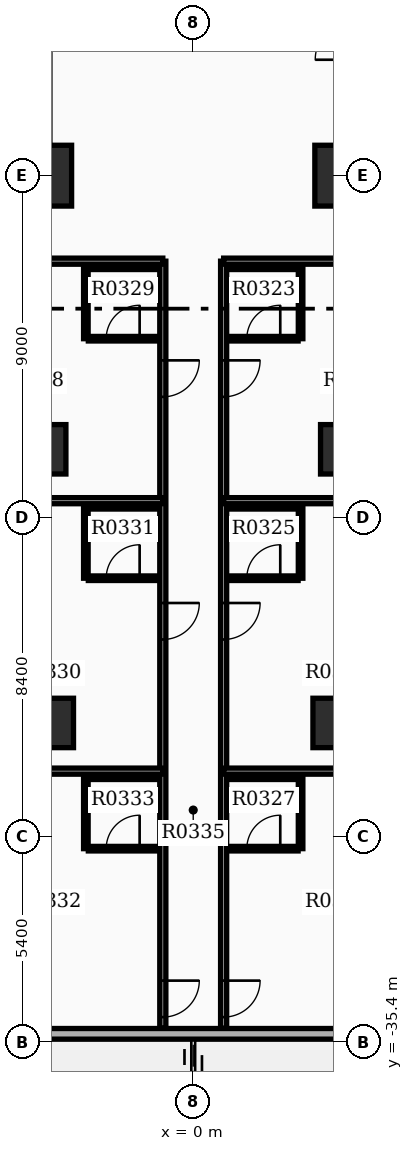
"""IFC4 building model, lengths in metres.
Left out: names, types, materials, properties, quantities, classifications, styles, units other than length and angle.
Written with IfcOpenShell. Run it as: python <this file> out.ifc"""

import sys

from ifc_helpers import new_model, si_unit, direction, frame, frame_2d, origin, origin_2d, place, context, subcontext, project, spatial, rectangle, extrude, element, fill, save


model = new_model("IFC4")
c1 = context("Model", 3, precision=1e-05, world=origin(), true_north=direction((0.0, 1.0)))
c2 = subcontext(c1, "Body", "Model", "MODEL_VIEW")
j1 = project(units=[si_unit("LENGTHUNIT", "METRE"), si_unit("PLANEANGLEUNIT", "RADIAN")], contexts=[c1])
p1 = place(None, origin())
s1 = spatial("IfcSite", under=j1, at=p1, CompositionType="ELEMENT")
p2 = place(p1, origin())
s2 = spatial("IfcBuilding", under=s1, at=p2, CompositionType="ELEMENT")
p3 = place(p2, frame((0.0, 0.0, 23.7)))
s3 = spatial("IfcBuildingStorey", under=s2, at=p3, CompositionType="ELEMENT", Elevation=23.7)
for number, where, z_axis, x_axis in (
    (1, (-4.0, -12.6, 0.0), (0.0, 0.0, 1.0), (1.0, 0.0, 0.0)),
    (2, (4.0, -12.6, 0.0), (0.0, 0.0, 1.0), (1.0, 0.0, 0.0)),
):
    element("IfcColumn", number, at=place(p3, frame(where, z_axis=z_axis, x_axis=x_axis)), inside=s3, PredefinedType="COLUMN", context=c2, shape_type="SweptSolid", body=[
        extrude(rectangle(XDim=1.6, YDim=1.6, at=origin_2d()), origin(), (0.0, 0.0, 1.0), 3.9),
    ])
for number, where, z_axis, x_axis in (
    (3, (-4.0, -19.8, 0.0), (0.0, 0.0, 1.0), (1.0, 0.0, 0.0)),
    (4, (4.0, -19.8, 0.0), (0.0, 0.0, 1.0), (1.0, 0.0, 0.0)),
    (5, (-3.8, -27.0, 0.0), (0.0, 0.0, 1.0), (1.0, 0.0, 0.0)),
    (6, (3.8, -27.0, 0.0), (0.0, 0.0, 1.0), (1.0, 0.0, 0.0)),
):
    element("IfcColumn", number, at=place(p3, frame(where, z_axis=z_axis, x_axis=x_axis)), inside=s3, PredefinedType="COLUMN", context=c2, shape_type="SweptSolid", body=[
        extrude(rectangle(XDim=1.3, YDim=1.3, at=origin_2d()), origin(), (0.0, 0.0, 1.0), 3.9),
    ])
p4 = place(p3, frame((-6.86, -35.18, 0.0), z_axis=(0.0, 0.0, 1.0), x_axis=(1.0, 0.0, 0.0)))
e7 = element("IfcWall", 7, at=p4, inside=s3, PredefinedType="STANDARD", context=c2, shape_type="SweptSolid", body=[
    extrude(rectangle(XDim=13.72, YDim=0.28, at=frame_2d((6.86, 0.0))), origin(), (0.0, 0.0, 1.0), 2.91),
])
p5 = place(p4, frame((0.85, 0.0, 0.85)))
e8 = element("IfcOpeningElement", 8, at=p5, cuts=e7, PredefinedType="OPENING", context=c2, shape_type="SweptSolid", body=[
    extrude(rectangle(XDim=1.0, YDim=1.5, at=frame_2d((0.5, 0.75))), frame((0.0, 0.15, 0.0), z_axis=(0.0, -1.0, 0.0), x_axis=(1.0, 0.0, 0.0)), (0.0, 0.0, 1.0), 0.3),
])
p6 = place(p3, frame((0.8, -14.85, 0.0), z_axis=(0.0, 0.0, 1.0), x_axis=(0.0, -1.0, 0.0)))
e9 = element("IfcWall", 9, at=p6, inside=s3, PredefinedType="PARTITIONING", context=c2, shape_type="SweptSolid", body=[
    extrude(rectangle(XDim=20.182, YDim=0.16, at=frame_2d((10.091, 0.0))), origin(), (0.0, 0.0, 1.0), 2.9),
])
p7 = place(p6, frame((2.61, 0.0, 0.0)))
e10 = element("IfcOpeningElement", 10, at=p7, cuts=e9, PredefinedType="OPENING", context=c2, shape_type="SweptSolid", body=[
    extrude(rectangle(XDim=0.96, YDim=2.15, at=frame_2d((0.48, 1.075))), frame((0.0, 0.09, 0.0), z_axis=(0.0, -1.0, 0.0), x_axis=(1.0, 0.0, 0.0)), (0.0, 0.0, 1.0), 0.18),
])
p8 = place(p6, frame((8.994, 0.0, 0.0)))
e11 = element("IfcOpeningElement", 11, at=p8, cuts=e9, PredefinedType="OPENING", context=c2, shape_type="SweptSolid", body=[
    extrude(rectangle(XDim=0.96, YDim=2.15, at=frame_2d((0.48, 1.075))), frame((0.0, 0.09, 0.0), z_axis=(0.0, -1.0, 0.0), x_axis=(1.0, 0.0, 0.0)), (0.0, 0.0, 1.0), 0.18),
])
p9 = place(p6, frame((18.93, 0.0, 0.0)))
e12 = element("IfcOpeningElement", 12, at=p9, cuts=e9, PredefinedType="OPENING", context=c2, shape_type="SweptSolid", body=[
    extrude(rectangle(XDim=0.96, YDim=2.15, at=frame_2d((0.48, 1.075))), frame((0.0, 0.09, 0.0), z_axis=(0.0, -1.0, 0.0), x_axis=(1.0, 0.0, 0.0)), (0.0, 0.0, 1.0), 0.18),
])
p10 = place(p3, frame((0.8, -14.85, 0.0), z_axis=(0.0, 0.0, 1.0), x_axis=(1.0, 0.0, 0.0)))
e13 = element("IfcWall", 13, at=p10, inside=s3, PredefinedType="PARTITIONING", context=c2, shape_type="SweptSolid", body=[
    extrude(rectangle(XDim=5.92, YDim=0.16, at=frame_2d((2.96, 0.0))), origin(), (0.0, 0.0, 1.0), 2.9),
])
p11 = place(p3, frame((0.8, -21.152, 0.0), z_axis=(0.0, 0.0, 1.0), x_axis=(1.0, 0.0, 0.0)))
e14 = element("IfcWall", 14, at=p11, inside=s3, PredefinedType="PARTITIONING", context=c2, shape_type="SweptSolid", body=[
    extrude(rectangle(XDim=5.772, YDim=0.16, at=frame_2d((2.886, 0.0))), origin(), (0.0, 0.0, 1.0), 2.9),
])
p12 = place(p3, frame((0.94, -16.89, 0.0), z_axis=(0.0, 0.0, 1.0), x_axis=(1.0, 0.0, 0.0)))
e15 = element("IfcWall", 15, at=p12, inside=s3, PredefinedType="PARTITIONING", context=c2, shape_type="SweptSolid", body=[
    extrude(rectangle(XDim=1.82, YDim=0.12, at=frame_2d((0.91, 0.0))), origin(), (0.0, 0.0, 1.0), 2.9),
])
p13 = place(p12, frame((0.47, 0.0, 0.0)))
e16 = element("IfcOpeningElement", 16, at=p13, cuts=e15, PredefinedType="OPENING", context=c2, shape_type="SweptSolid", body=[
    extrude(rectangle(XDim=0.88, YDim=2.1, at=frame_2d((0.44, 1.05))), frame((0.0, 0.07, 0.0), z_axis=(0.0, -1.0, 0.0), x_axis=(1.0, 0.0, 0.0)), (0.0, 0.0, 1.0), 0.14),
])
p14 = place(p3, frame((0.94, -15.01, 0.0), z_axis=(0.0, 0.0, 1.0), x_axis=(1.0, 0.0, 0.0)))
e17 = element("IfcWall", 17, at=p14, inside=s3, PredefinedType="PARTITIONING", context=c2, shape_type="SweptSolid", body=[
    extrude(rectangle(XDim=1.82, YDim=0.12, at=frame_2d((0.91, 0.0))), origin(), (0.0, 0.0, 1.0), 2.9),
])
p15 = place(p3, frame((2.825, -15.01, 0.0), z_axis=(0.0, 0.0, 1.0), x_axis=(0.0, -1.0, 0.0)))
e18 = element("IfcWall", 18, at=p15, inside=s3, PredefinedType="PARTITIONING", context=c2, shape_type="SweptSolid", body=[
    extrude(rectangle(XDim=1.88, YDim=0.12, at=frame_2d((0.94, 0.0))), origin(), (0.0, 0.0, 1.0), 2.9),
])
p16 = place(p3, frame((0.8, -28.268, 0.0), z_axis=(0.0, 0.0, 1.0), x_axis=(1.0, 0.0, 0.0)))
e19 = element("IfcWall", 19, at=p16, inside=s3, PredefinedType="PARTITIONING", context=c2, shape_type="SweptSolid", body=[
    extrude(rectangle(XDim=5.772, YDim=0.16, at=frame_2d((2.886, 0.0))), origin(), (0.0, 0.0, 1.0), 2.9),
])
p17 = place(p3, frame((0.94, -23.192, 0.0), z_axis=(0.0, 0.0, 1.0), x_axis=(1.0, 0.0, 0.0)))
e20 = element("IfcWall", 20, at=p17, inside=s3, PredefinedType="PARTITIONING", context=c2, shape_type="SweptSolid", body=[
    extrude(rectangle(XDim=1.82, YDim=0.12, at=frame_2d((0.91, 0.0))), origin(), (0.0, 0.0, 1.0), 2.9),
])
p18 = place(p17, frame((0.47, 0.0, 0.0)))
e21 = element("IfcOpeningElement", 21, at=p18, cuts=e20, PredefinedType="OPENING", context=c2, shape_type="SweptSolid", body=[
    extrude(rectangle(XDim=0.88, YDim=2.1, at=frame_2d((0.44, 1.05))), frame((0.0, 0.07, 0.0), z_axis=(0.0, -1.0, 0.0), x_axis=(1.0, 0.0, 0.0)), (0.0, 0.0, 1.0), 0.14),
])
p19 = place(p3, frame((0.94, -21.312, 0.0), z_axis=(0.0, 0.0, 1.0), x_axis=(1.0, 0.0, 0.0)))
e22 = element("IfcWall", 22, at=p19, inside=s3, PredefinedType="PARTITIONING", context=c2, shape_type="SweptSolid", body=[
    extrude(rectangle(XDim=1.82, YDim=0.12, at=frame_2d((0.91, 0.0))), origin(), (0.0, 0.0, 1.0), 2.9),
])
p20 = place(p3, frame((2.825, -21.312, 0.0), z_axis=(0.0, 0.0, 1.0), x_axis=(0.0, -1.0, 0.0)))
e23 = element("IfcWall", 23, at=p20, inside=s3, PredefinedType="PARTITIONING", context=c2, shape_type="SweptSolid", body=[
    extrude(rectangle(XDim=1.88, YDim=0.12, at=frame_2d((0.94, 0.0))), origin(), (0.0, 0.0, 1.0), 2.9),
])
p21 = place(p3, frame((0.94, -30.308, 0.0), z_axis=(0.0, 0.0, 1.0), x_axis=(1.0, 0.0, 0.0)))
e24 = element("IfcWall", 24, at=p21, inside=s3, PredefinedType="PARTITIONING", context=c2, shape_type="SweptSolid", body=[
    extrude(rectangle(XDim=1.82, YDim=0.12, at=frame_2d((0.91, 0.0))), origin(), (0.0, 0.0, 1.0), 2.9),
])
p22 = place(p21, frame((0.47, 0.0, 0.0)))
e25 = element("IfcOpeningElement", 25, at=p22, cuts=e24, PredefinedType="OPENING", context=c2, shape_type="SweptSolid", body=[
    extrude(rectangle(XDim=0.88, YDim=2.1, at=frame_2d((0.44, 1.05))), frame((0.0, 0.07, 0.0), z_axis=(0.0, -1.0, 0.0), x_axis=(1.0, 0.0, 0.0)), (0.0, 0.0, 1.0), 0.14),
])
p23 = place(p3, frame((0.94, -28.428, 0.0), z_axis=(0.0, 0.0, 1.0), x_axis=(1.0, 0.0, 0.0)))
e26 = element("IfcWall", 26, at=p23, inside=s3, PredefinedType="PARTITIONING", context=c2, shape_type="SweptSolid", body=[
    extrude(rectangle(XDim=1.82, YDim=0.12, at=frame_2d((0.91, 0.0))), origin(), (0.0, 0.0, 1.0), 2.9),
])
p24 = place(p3, frame((2.825, -28.428, 0.0), z_axis=(0.0, 0.0, 1.0), x_axis=(0.0, -1.0, 0.0)))
e27 = element("IfcWall", 27, at=p24, inside=s3, PredefinedType="PARTITIONING", context=c2, shape_type="SweptSolid", body=[
    extrude(rectangle(XDim=1.88, YDim=0.12, at=frame_2d((0.94, 0.0))), origin(), (0.0, 0.0, 1.0), 2.9),
])
p25 = place(p3, frame((-0.8, -14.85, 0.0), z_axis=(0.0, 0.0, 1.0), x_axis=(0.0, -1.0, 0.0)))
e28 = element("IfcWall", 28, at=p25, inside=s3, PredefinedType="PARTITIONING", context=c2, shape_type="SweptSolid", body=[
    extrude(rectangle(XDim=20.182, YDim=0.16, at=frame_2d((10.091, 0.0))), origin(), (0.0, 0.0, 1.0), 2.9),
])
p26 = place(p25, frame((2.61, 0.0, 0.0)))
e29 = element("IfcOpeningElement", 29, at=p26, cuts=e28, PredefinedType="OPENING", context=c2, shape_type="SweptSolid", body=[
    extrude(rectangle(XDim=0.96, YDim=2.15, at=frame_2d((0.48, 1.075))), frame((0.0, 0.09, 0.0), z_axis=(0.0, -1.0, 0.0), x_axis=(1.0, 0.0, 0.0)), (0.0, 0.0, 1.0), 0.18),
])
p27 = place(p25, frame((8.994, 0.0, 0.0)))
e30 = element("IfcOpeningElement", 30, at=p27, cuts=e28, PredefinedType="OPENING", context=c2, shape_type="SweptSolid", body=[
    extrude(rectangle(XDim=0.96, YDim=2.15, at=frame_2d((0.48, 1.075))), frame((0.0, 0.09, 0.0), z_axis=(0.0, -1.0, 0.0), x_axis=(1.0, 0.0, 0.0)), (0.0, 0.0, 1.0), 0.18),
])
p28 = place(p25, frame((18.93, 0.0, 0.0)))
e31 = element("IfcOpeningElement", 31, at=p28, cuts=e28, PredefinedType="OPENING", context=c2, shape_type="SweptSolid", body=[
    extrude(rectangle(XDim=0.96, YDim=2.15, at=frame_2d((0.48, 1.075))), frame((0.0, 0.09, 0.0), z_axis=(0.0, -1.0, 0.0), x_axis=(1.0, 0.0, 0.0)), (0.0, 0.0, 1.0), 0.18),
])
p29 = place(p3, frame((-0.8, -14.85, 0.0), z_axis=(0.0, 0.0, 1.0), x_axis=(-1.0, 0.0, 0.0)))
e32 = element("IfcWall", 32, at=p29, inside=s3, PredefinedType="PARTITIONING", context=c2, shape_type="SweptSolid", body=[
    extrude(rectangle(XDim=5.92, YDim=0.16, at=frame_2d((2.96, 0.0))), origin(), (0.0, 0.0, 1.0), 2.9),
])
p30 = place(p3, frame((-0.8, -21.152, 0.0), z_axis=(0.0, 0.0, 1.0), x_axis=(-1.0, 0.0, 0.0)))
e33 = element("IfcWall", 33, at=p30, inside=s3, PredefinedType="PARTITIONING", context=c2, shape_type="SweptSolid", body=[
    extrude(rectangle(XDim=5.772, YDim=0.16, at=frame_2d((2.886, 0.0))), origin(), (0.0, 0.0, 1.0), 2.9),
])
p31 = place(p3, frame((-2.76, -16.89, 0.0), z_axis=(0.0, 0.0, 1.0), x_axis=(1.0, 0.0, 0.0)))
e34 = element("IfcWall", 34, at=p31, inside=s3, PredefinedType="PARTITIONING", context=c2, shape_type="SweptSolid", body=[
    extrude(rectangle(XDim=1.82, YDim=0.12, at=frame_2d((0.91, 0.0))), origin(), (0.0, 0.0, 1.0), 2.9),
])
p32 = place(p31, frame((0.47, 0.0, 0.0)))
e35 = element("IfcOpeningElement", 35, at=p32, cuts=e34, PredefinedType="OPENING", context=c2, shape_type="SweptSolid", body=[
    extrude(rectangle(XDim=0.88, YDim=2.1, at=frame_2d((0.44, 1.05))), frame((0.0, 0.07, 0.0), z_axis=(0.0, -1.0, 0.0), x_axis=(1.0, 0.0, 0.0)), (0.0, 0.0, 1.0), 0.14),
])
p33 = place(p3, frame((-2.76, -15.01, 0.0), z_axis=(0.0, 0.0, 1.0), x_axis=(1.0, 0.0, 0.0)))
e36 = element("IfcWall", 36, at=p33, inside=s3, PredefinedType="PARTITIONING", context=c2, shape_type="SweptSolid", body=[
    extrude(rectangle(XDim=1.82, YDim=0.12, at=frame_2d((0.91, 0.0))), origin(), (0.0, 0.0, 1.0), 2.9),
])
p34 = place(p3, frame((-2.825, -15.01, 0.0), z_axis=(0.0, 0.0, 1.0), x_axis=(0.0, -1.0, 0.0)))
e37 = element("IfcWall", 37, at=p34, inside=s3, PredefinedType="PARTITIONING", context=c2, shape_type="SweptSolid", body=[
    extrude(rectangle(XDim=1.88, YDim=0.12, at=frame_2d((0.94, 0.0))), origin(), (0.0, 0.0, 1.0), 2.9),
])
p35 = place(p3, frame((-0.8, -28.268, 0.0), z_axis=(0.0, 0.0, 1.0), x_axis=(-1.0, 0.0, 0.0)))
e38 = element("IfcWall", 38, at=p35, inside=s3, PredefinedType="PARTITIONING", context=c2, shape_type="SweptSolid", body=[
    extrude(rectangle(XDim=5.772, YDim=0.16, at=frame_2d((2.886, 0.0))), origin(), (0.0, 0.0, 1.0), 2.9),
])
p36 = place(p3, frame((-2.76, -23.192, 0.0), z_axis=(0.0, 0.0, 1.0), x_axis=(1.0, 0.0, 0.0)))
e39 = element("IfcWall", 39, at=p36, inside=s3, PredefinedType="PARTITIONING", context=c2, shape_type="SweptSolid", body=[
    extrude(rectangle(XDim=1.82, YDim=0.12, at=frame_2d((0.91, 0.0))), origin(), (0.0, 0.0, 1.0), 2.9),
])
p37 = place(p36, frame((0.47, 0.0, 0.0)))
e40 = element("IfcOpeningElement", 40, at=p37, cuts=e39, PredefinedType="OPENING", context=c2, shape_type="SweptSolid", body=[
    extrude(rectangle(XDim=0.88, YDim=2.1, at=frame_2d((0.44, 1.05))), frame((0.0, 0.07, 0.0), z_axis=(0.0, -1.0, 0.0), x_axis=(1.0, 0.0, 0.0)), (0.0, 0.0, 1.0), 0.14),
])
p38 = place(p3, frame((-2.76, -21.312, 0.0), z_axis=(0.0, 0.0, 1.0), x_axis=(1.0, 0.0, 0.0)))
e41 = element("IfcWall", 41, at=p38, inside=s3, PredefinedType="PARTITIONING", context=c2, shape_type="SweptSolid", body=[
    extrude(rectangle(XDim=1.82, YDim=0.12, at=frame_2d((0.91, 0.0))), origin(), (0.0, 0.0, 1.0), 2.9),
])
p39 = place(p3, frame((-2.825, -21.312, 0.0), z_axis=(0.0, 0.0, 1.0), x_axis=(0.0, -1.0, 0.0)))
e42 = element("IfcWall", 42, at=p39, inside=s3, PredefinedType="PARTITIONING", context=c2, shape_type="SweptSolid", body=[
    extrude(rectangle(XDim=1.88, YDim=0.12, at=frame_2d((0.94, 0.0))), origin(), (0.0, 0.0, 1.0), 2.9),
])
p40 = place(p3, frame((-2.76, -30.308, 0.0), z_axis=(0.0, 0.0, 1.0), x_axis=(1.0, 0.0, 0.0)))
e43 = element("IfcWall", 43, at=p40, inside=s3, PredefinedType="PARTITIONING", context=c2, shape_type="SweptSolid", body=[
    extrude(rectangle(XDim=1.82, YDim=0.12, at=frame_2d((0.91, 0.0))), origin(), (0.0, 0.0, 1.0), 2.9),
])
p41 = place(p40, frame((0.47, 0.0, 0.0)))
e44 = element("IfcOpeningElement", 44, at=p41, cuts=e43, PredefinedType="OPENING", context=c2, shape_type="SweptSolid", body=[
    extrude(rectangle(XDim=0.88, YDim=2.1, at=frame_2d((0.44, 1.05))), frame((0.0, 0.07, 0.0), z_axis=(0.0, -1.0, 0.0), x_axis=(1.0, 0.0, 0.0)), (0.0, 0.0, 1.0), 0.14),
])
p42 = place(p3, frame((-2.76, -28.428, 0.0), z_axis=(0.0, 0.0, 1.0), x_axis=(1.0, 0.0, 0.0)))
e45 = element("IfcWall", 45, at=p42, inside=s3, PredefinedType="PARTITIONING", context=c2, shape_type="SweptSolid", body=[
    extrude(rectangle(XDim=1.82, YDim=0.12, at=frame_2d((0.91, 0.0))), origin(), (0.0, 0.0, 1.0), 2.9),
])
p43 = place(p3, frame((-2.825, -28.428, 0.0), z_axis=(0.0, 0.0, 1.0), x_axis=(0.0, -1.0, 0.0)))
e46 = element("IfcWall", 46, at=p43, inside=s3, PredefinedType="PARTITIONING", context=c2, shape_type="SweptSolid", body=[
    extrude(rectangle(XDim=1.88, YDim=0.12, at=frame_2d((0.94, 0.0))), origin(), (0.0, 0.0, 1.0), 2.9),
])
p44 = place(p7, origin())
e47 = element("IfcDoor", 47, at=p44, inside=s3, OperationType="SINGLE_SWING_LEFT", PredefinedType="DOOR", context=c2, shape_type="SweptSolid", body=[
    extrude(rectangle(XDim=0.96, YDim=2.15, at=frame_2d((0.48, 1.075))), frame((0.0, 0.025, 0.0), z_axis=(0.0, -1.0, 0.0), x_axis=(1.0, 0.0, 0.0)), (0.0, 0.0, 1.0), 0.05),
])
fill(e10, e47)
p45 = place(p13, origin())
e48 = element("IfcDoor", 48, at=p45, inside=s3, OperationType="SINGLE_SWING_RIGHT", PredefinedType="DOOR", context=c2, shape_type="SweptSolid", body=[
    extrude(rectangle(XDim=0.88, YDim=2.1, at=frame_2d((0.44, 1.05))), frame((0.0, 0.025, 0.0), z_axis=(0.0, -1.0, 0.0), x_axis=(1.0, 0.0, 0.0)), (0.0, 0.0, 1.0), 0.05),
])
fill(e16, e48)
p46 = place(p8, origin())
e49 = element("IfcDoor", 49, at=p46, inside=s3, OperationType="SINGLE_SWING_LEFT", PredefinedType="DOOR", context=c2, shape_type="SweptSolid", body=[
    extrude(rectangle(XDim=0.96, YDim=2.15, at=frame_2d((0.48, 1.075))), frame((0.0, 0.025, 0.0), z_axis=(0.0, -1.0, 0.0), x_axis=(1.0, 0.0, 0.0)), (0.0, 0.0, 1.0), 0.05),
])
fill(e11, e49)
p47 = place(p18, origin())
e50 = element("IfcDoor", 50, at=p47, inside=s3, OperationType="SINGLE_SWING_RIGHT", PredefinedType="DOOR", context=c2, shape_type="SweptSolid", body=[
    extrude(rectangle(XDim=0.88, YDim=2.1, at=frame_2d((0.44, 1.05))), frame((0.0, 0.025, 0.0), z_axis=(0.0, -1.0, 0.0), x_axis=(1.0, 0.0, 0.0)), (0.0, 0.0, 1.0), 0.05),
])
fill(e21, e50)
p48 = place(p9, origin())
e51 = element("IfcDoor", 51, at=p48, inside=s3, OperationType="SINGLE_SWING_LEFT", PredefinedType="DOOR", context=c2, shape_type="SweptSolid", body=[
    extrude(rectangle(XDim=0.96, YDim=2.15, at=frame_2d((0.48, 1.075))), frame((0.0, 0.025, 0.0), z_axis=(0.0, -1.0, 0.0), x_axis=(1.0, 0.0, 0.0)), (0.0, 0.0, 1.0), 0.05),
])
fill(e12, e51)
p49 = place(p22, origin())
e52 = element("IfcDoor", 52, at=p49, inside=s3, OperationType="SINGLE_SWING_RIGHT", PredefinedType="DOOR", context=c2, shape_type="SweptSolid", body=[
    extrude(rectangle(XDim=0.88, YDim=2.1, at=frame_2d((0.44, 1.05))), frame((0.0, 0.025, 0.0), z_axis=(0.0, -1.0, 0.0), x_axis=(1.0, 0.0, 0.0)), (0.0, 0.0, 1.0), 0.05),
])
fill(e25, e52)
p50 = place(p26, origin())
e53 = element("IfcDoor", 53, at=p50, inside=s3, OperationType="SINGLE_SWING_LEFT", PredefinedType="DOOR", context=c2, shape_type="SweptSolid", body=[
    extrude(rectangle(XDim=0.96, YDim=2.15, at=frame_2d((0.48, 1.075))), frame((0.0, 0.025, 0.0), z_axis=(0.0, -1.0, 0.0), x_axis=(1.0, 0.0, 0.0)), (0.0, 0.0, 1.0), 0.05),
])
fill(e29, e53)
p51 = place(p32, origin())
e54 = element("IfcDoor", 54, at=p51, inside=s3, OperationType="SINGLE_SWING_RIGHT", PredefinedType="DOOR", context=c2, shape_type="SweptSolid", body=[
    extrude(rectangle(XDim=0.88, YDim=2.1, at=frame_2d((0.44, 1.05))), frame((0.0, 0.025, 0.0), z_axis=(0.0, -1.0, 0.0), x_axis=(1.0, 0.0, 0.0)), (0.0, 0.0, 1.0), 0.05),
])
fill(e35, e54)
p52 = place(p27, origin())
e55 = element("IfcDoor", 55, at=p52, inside=s3, OperationType="SINGLE_SWING_LEFT", PredefinedType="DOOR", context=c2, shape_type="SweptSolid", body=[
    extrude(rectangle(XDim=0.96, YDim=2.15, at=frame_2d((0.48, 1.075))), frame((0.0, 0.025, 0.0), z_axis=(0.0, -1.0, 0.0), x_axis=(1.0, 0.0, 0.0)), (0.0, 0.0, 1.0), 0.05),
])
fill(e30, e55)
p53 = place(p37, origin())
e56 = element("IfcDoor", 56, at=p53, inside=s3, OperationType="SINGLE_SWING_RIGHT", PredefinedType="DOOR", context=c2, shape_type="SweptSolid", body=[
    extrude(rectangle(XDim=0.88, YDim=2.1, at=frame_2d((0.44, 1.05))), frame((0.0, 0.025, 0.0), z_axis=(0.0, -1.0, 0.0), x_axis=(1.0, 0.0, 0.0)), (0.0, 0.0, 1.0), 0.05),
])
fill(e40, e56)
p54 = place(p28, origin())
e57 = element("IfcDoor", 57, at=p54, inside=s3, OperationType="SINGLE_SWING_LEFT", PredefinedType="DOOR", context=c2, shape_type="SweptSolid", body=[
    extrude(rectangle(XDim=0.96, YDim=2.15, at=frame_2d((0.48, 1.075))), frame((0.0, 0.025, 0.0), z_axis=(0.0, -1.0, 0.0), x_axis=(1.0, 0.0, 0.0)), (0.0, 0.0, 1.0), 0.05),
])
fill(e31, e57)
p55 = place(p41, origin())
e58 = element("IfcDoor", 58, at=p55, inside=s3, OperationType="SINGLE_SWING_RIGHT", PredefinedType="DOOR", context=c2, shape_type="SweptSolid", body=[
    extrude(rectangle(XDim=0.88, YDim=2.1, at=frame_2d((0.44, 1.05))), frame((0.0, 0.025, 0.0), z_axis=(0.0, -1.0, 0.0), x_axis=(1.0, 0.0, 0.0)), (0.0, 0.0, 1.0), 0.05),
])
fill(e44, e58)
save(model, sys.argv[1])
